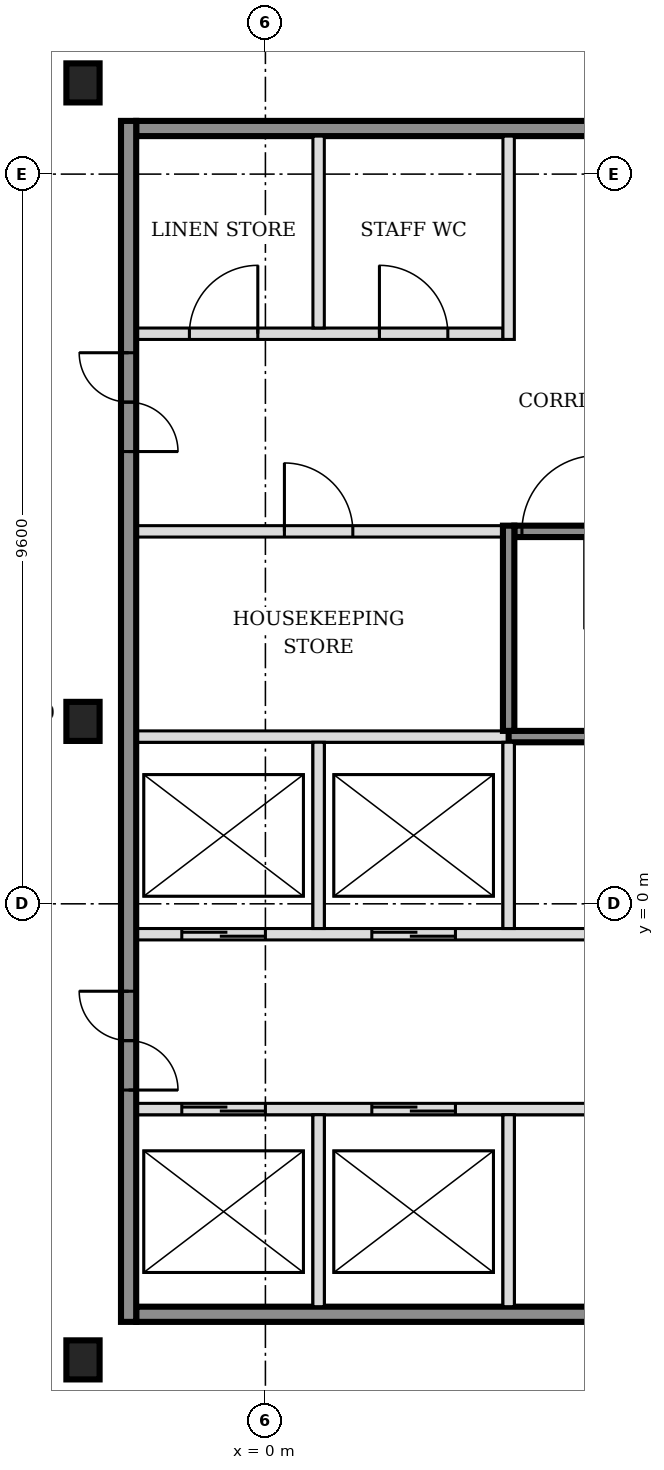
"""IFC4 building model, lengths in metres.
Left out: names, types, materials, properties, quantities, classifications, styles, units other than length and angle.
Written with IfcOpenShell. Run it as: python <this file> out.ifc"""

import sys

from ifc_helpers import new_model, si_unit, direction, frame, frame_2d, origin, origin_2d, place, context, subcontext, project, spatial, rectangle, i_section, extrude, element, fill, save


model = new_model("IFC4")
c1 = context("Model", 3, precision=1e-05, world=origin(), true_north=direction((0.0, 1.0)))
c2 = subcontext(c1, "Body", "Model", "MODEL_VIEW")
j1 = project(units=[si_unit("LENGTHUNIT", "METRE"), si_unit("PLANEANGLEUNIT", "RADIAN")], contexts=[c1])
p1 = place(None, origin())
s1 = spatial("IfcSite", under=j1, at=p1, CompositionType="ELEMENT")
p2 = place(p1, origin())
s2 = spatial("IfcBuilding", under=s1, at=p2, CompositionType="ELEMENT")
p3 = place(p2, frame((0.0, 0.0, 72.6)))
s3 = spatial("IfcBuildingStorey", under=s2, at=p3, CompositionType="ELEMENT", Elevation=72.6)
for number, where, z_axis, x_axis in (
    (1, (-2.4, -6.0, -0.15), (0.0, 0.0, 1.0), (1.0, 0.0, 0.0)),
    (2, (-2.4, 2.4, -0.15), (0.0, 0.0, 1.0), (1.0, 0.0, 0.0)),
    (3, (-2.4, 10.8, -0.15), (0.0, 0.0, 1.0), (1.0, 0.0, 0.0)),
):
    element("IfcColumn", number, at=place(p3, frame(where, z_axis=z_axis, x_axis=x_axis)), inside=s3, PredefinedType="COLUMN", context=c2, shape_type="SweptSolid", body=[
        extrude(i_section(OverallWidth=0.437, OverallDepth=0.514, WebThickness=0.061, FlangeThickness=0.097, FilletRadius=0.015, at=origin_2d()), origin(), (0.0, 0.0, 1.0), 3.6),
    ])
p4 = place(p3, frame((-1.7, -5.4, 0.0), z_axis=(0.0, 0.0, 1.0), x_axis=(1.0, 0.0, 0.0)))
e4 = element("IfcWall", 4, at=p4, inside=s3, PredefinedType="SOLIDWALL", context=c2, shape_type="SweptSolid", body=[
    extrude(rectangle(XDim=7.9, YDim=0.2, at=frame_2d((3.95, 0.0))), origin(), (0.0, 0.0, 1.0), 3.45),
])
p5 = place(p3, frame((-1.7, -2.7, 0.0), z_axis=(0.0, 0.0, 1.0), x_axis=(1.0, 0.0, 0.0)))
e5 = element("IfcWall", 5, at=p5, inside=s3, PredefinedType="SOLIDWALL", context=c2, shape_type="SweptSolid", body=[
    extrude(rectangle(XDim=7.9, YDim=0.15, at=frame_2d((3.95, 0.0))), origin(), (0.0, 0.0, 1.0), 3.45),
])
p6 = place(p5, frame((0.6, 0.0, 0.0)))
e6 = element("IfcOpeningElement", 6, at=p6, cuts=e5, PredefinedType="OPENING", context=c2, shape_type="SweptSolid", body=[
    extrude(rectangle(XDim=1.1, YDim=2.1, at=frame_2d((0.55, 1.05))), frame((0.0, 0.085, 0.0), z_axis=(0.0, -1.0, 0.0), x_axis=(1.0, 0.0, 0.0)), (0.0, 0.0, 1.0), 0.17),
])
p7 = place(p5, frame((3.1, 0.0, 0.0)))
e7 = element("IfcOpeningElement", 7, at=p7, cuts=e5, PredefinedType="OPENING", context=c2, shape_type="SweptSolid", body=[
    extrude(rectangle(XDim=1.1, YDim=2.1, at=frame_2d((0.55, 1.05))), frame((0.0, 0.085, 0.0), z_axis=(0.0, -1.0, 0.0), x_axis=(1.0, 0.0, 0.0)), (0.0, 0.0, 1.0), 0.17),
])
p8 = place(p3, frame((-1.7, -0.4, 0.0), z_axis=(0.0, 0.0, 1.0), x_axis=(1.0, 0.0, 0.0)))
e8 = element("IfcWall", 8, at=p8, inside=s3, PredefinedType="SOLIDWALL", context=c2, shape_type="SweptSolid", body=[
    extrude(rectangle(XDim=15.925, YDim=0.15, at=frame_2d((7.962, 0.0))), origin(), (0.0, 0.0, 1.0), 3.45),
])
p9 = place(p8, frame((0.6, 0.0, 0.0)))
e9 = element("IfcOpeningElement", 9, at=p9, cuts=e8, PredefinedType="OPENING", context=c2, shape_type="SweptSolid", body=[
    extrude(rectangle(XDim=1.1, YDim=2.1, at=frame_2d((0.55, 1.05))), frame((0.0, 0.085, 0.0), z_axis=(0.0, -1.0, 0.0), x_axis=(1.0, 0.0, 0.0)), (0.0, 0.0, 1.0), 0.17),
])
p10 = place(p8, frame((3.1, 0.0, 0.0)))
e10 = element("IfcOpeningElement", 10, at=p10, cuts=e8, PredefinedType="OPENING", context=c2, shape_type="SweptSolid", body=[
    extrude(rectangle(XDim=1.1, YDim=2.1, at=frame_2d((0.55, 1.05))), frame((0.0, 0.085, 0.0), z_axis=(0.0, -1.0, 0.0), x_axis=(1.0, 0.0, 0.0)), (0.0, 0.0, 1.0), 0.17),
])
p11 = place(p8, frame((11.575, 0.0, 0.0)))
e11 = element("IfcOpeningElement", 11, at=p11, cuts=e8, PredefinedType="OPENING", context=c2, shape_type="SweptSolid", body=[
    extrude(rectangle(XDim=1.2, YDim=2.1, at=frame_2d((0.6, 1.05))), frame((0.0, 0.085, 0.0), z_axis=(0.0, -1.0, 0.0), x_axis=(1.0, 0.0, 0.0)), (0.0, 0.0, 1.0), 0.17),
])
p12 = place(p8, frame((14.125, 0.0, 0.0)))
e12 = element("IfcOpeningElement", 12, at=p12, cuts=e8, PredefinedType="OPENING", context=c2, shape_type="SweptSolid", body=[
    extrude(rectangle(XDim=1.2, YDim=2.1, at=frame_2d((0.6, 1.05))), frame((0.0, 0.085, 0.0), z_axis=(0.0, -1.0, 0.0), x_axis=(1.0, 0.0, 0.0)), (0.0, 0.0, 1.0), 0.17),
])
p13 = place(p3, frame((-1.7, 2.2, 0.0), z_axis=(0.0, 0.0, 1.0), x_axis=(1.0, 0.0, 0.0)))
e13 = element("IfcWall", 13, at=p13, inside=s3, PredefinedType="SOLIDWALL", context=c2, shape_type="SweptSolid", body=[
    extrude(rectangle(XDim=4.9, YDim=0.15, at=frame_2d((2.45, 0.0))), origin(), (0.0, 0.0, 1.0), 3.45),
])
p14 = place(p3, frame((3.2, 2.2, 0.0), z_axis=(0.0, 0.0, 1.0), x_axis=(1.0, 0.0, 0.0)))
e14 = element("IfcWall", 14, at=p14, inside=s3, PredefinedType="SOLIDWALL", context=c2, shape_type="SweptSolid", body=[
    extrude(rectangle(XDim=6.5, YDim=0.15, at=frame_2d((3.25, 0.0))), origin(), (0.0, 0.0, 1.0), 3.45),
])
p15 = place(p3, frame((-1.7, 4.9, 0.0), z_axis=(0.0, 0.0, 1.0), x_axis=(1.0, 0.0, 0.0)))
e15 = element("IfcWall", 15, at=p15, inside=s3, PredefinedType="PARTITIONING", context=c2, shape_type="SweptSolid", body=[
    extrude(rectangle(XDim=4.825, YDim=0.15, at=frame_2d((2.413, 0.0))), origin(), (0.0, 0.0, 1.0), 3.45),
])
p16 = place(p15, frame((1.95, 0.0, 0.0)))
e16 = element("IfcOpeningElement", 16, at=p16, cuts=e15, PredefinedType="OPENING", context=c2, shape_type="SweptSolid", body=[
    extrude(rectangle(XDim=0.9, YDim=2.1, at=frame_2d((0.45, 1.05))), frame((0.0, 0.085, 0.0), z_axis=(0.0, -1.0, 0.0), x_axis=(1.0, 0.0, 0.0)), (0.0, 0.0, 1.0), 0.17),
])
p17 = place(p3, frame((3.275, 4.9, 0.0), z_axis=(0.0, 0.0, 1.0), x_axis=(1.0, 0.0, 0.0)))
e17 = element("IfcWall", 17, at=p17, inside=s3, PredefinedType="SOLIDWALL", context=c2, shape_type="SweptSolid", body=[
    extrude(rectangle(XDim=6.425, YDim=0.15, at=frame_2d((3.212, 0.0))), origin(), (0.0, 0.0, 1.0), 3.45),
])
p18 = place(p17, frame((0.1, 0.0, 0.0)))
e18 = element("IfcOpeningElement", 18, at=p18, cuts=e17, PredefinedType="OPENING", context=c2, shape_type="SweptSolid", body=[
    extrude(rectangle(XDim=1.0, YDim=2.1, at=frame_2d((0.5, 1.05))), frame((0.0, 0.085, 0.0), z_axis=(0.0, -1.0, 0.0), x_axis=(1.0, 0.0, 0.0)), (0.0, 0.0, 1.0), 0.17),
])
p19 = place(p3, frame((-1.7, 7.5, 0.0), z_axis=(0.0, 0.0, 1.0), x_axis=(1.0, 0.0, 0.0)))
e19 = element("IfcWall", 19, at=p19, inside=s3, PredefinedType="PARTITIONING", context=c2, shape_type="SweptSolid", body=[
    extrude(rectangle(XDim=4.825, YDim=0.15, at=frame_2d((2.413, 0.0))), origin(), (0.0, 0.0, 1.0), 3.45),
])
p20 = place(p19, frame((0.7, 0.0, 0.0)))
e20 = element("IfcOpeningElement", 20, at=p20, cuts=e19, PredefinedType="OPENING", context=c2, shape_type="SweptSolid", body=[
    extrude(rectangle(XDim=0.9, YDim=2.1, at=frame_2d((0.45, 1.05))), frame((0.0, 0.085, 0.0), z_axis=(0.0, -1.0, 0.0), x_axis=(1.0, 0.0, 0.0)), (0.0, 0.0, 1.0), 0.17),
])
p21 = place(p19, frame((3.2, 0.0, 0.0)))
e21 = element("IfcOpeningElement", 21, at=p21, cuts=e19, PredefinedType="OPENING", context=c2, shape_type="SweptSolid", body=[
    extrude(rectangle(XDim=0.9, YDim=2.1, at=frame_2d((0.45, 1.05))), frame((0.0, 0.085, 0.0), z_axis=(0.0, -1.0, 0.0), x_axis=(1.0, 0.0, 0.0)), (0.0, 0.0, 1.0), 0.17),
])
p22 = place(p3, frame((-1.7, 10.2, 0.0), z_axis=(0.0, 0.0, 1.0), x_axis=(1.0, 0.0, 0.0)))
e22 = element("IfcWall", 22, at=p22, inside=s3, PredefinedType="SOLIDWALL", context=c2, shape_type="SweptSolid", body=[
    extrude(rectangle(XDim=7.9, YDim=0.2, at=frame_2d((3.95, 0.0))), origin(), (0.0, 0.0, 1.0), 3.45),
])
p23 = place(p3, frame((-1.8, -5.5, 0.0), z_axis=(0.0, 0.0, 1.0), x_axis=(0.0, 1.0, 0.0)))
e23 = element("IfcWall", 23, at=p23, inside=s3, PredefinedType="SOLIDWALL", context=c2, shape_type="SweptSolid", body=[
    extrude(rectangle(XDim=15.8, YDim=0.2, at=frame_2d((7.9, 0.0))), origin(), (0.0, 0.0, 1.0), 3.45),
])
p24 = place(p23, frame((3.05, 0.0, 0.0)))
e24 = element("IfcOpeningElement", 24, at=p24, cuts=e23, PredefinedType="OPENING", context=c2, shape_type="SweptSolid", body=[
    extrude(rectangle(XDim=1.3, YDim=2.1, at=frame_2d((0.65, 1.05))), frame((0.0, 0.11, 0.0), z_axis=(0.0, -1.0, 0.0), x_axis=(1.0, 0.0, 0.0)), (0.0, 0.0, 1.0), 0.22),
])
p25 = place(p23, frame((11.45, 0.0, 0.0)))
e25 = element("IfcOpeningElement", 25, at=p25, cuts=e23, PredefinedType="OPENING", context=c2, shape_type="SweptSolid", body=[
    extrude(rectangle(XDim=1.3, YDim=2.1, at=frame_2d((0.65, 1.05))), frame((0.0, 0.11, 0.0), z_axis=(0.0, -1.0, 0.0), x_axis=(1.0, 0.0, 0.0)), (0.0, 0.0, 1.0), 0.22),
])
p26 = place(p3, frame((0.7, -5.3, 0.0), z_axis=(0.0, 0.0, 1.0), x_axis=(0.0, 1.0, 0.0)))
e26 = element("IfcWall", 26, at=p26, inside=s3, PredefinedType="SOLIDWALL", context=c2, shape_type="SweptSolid", body=[
    extrude(rectangle(XDim=2.525, YDim=0.15, at=frame_2d((1.263, 0.0))), origin(), (0.0, 0.0, 1.0), 3.45),
])
p27 = place(p3, frame((0.7, -0.325, 0.0), z_axis=(0.0, 0.0, 1.0), x_axis=(0.0, 1.0, 0.0)))
e27 = element("IfcWall", 27, at=p27, inside=s3, PredefinedType="SOLIDWALL", context=c2, shape_type="SweptSolid", body=[
    extrude(rectangle(XDim=2.45, YDim=0.15, at=frame_2d((1.225, 0.0))), origin(), (0.0, 0.0, 1.0), 3.45),
])
p28 = place(p3, frame((0.7, 7.575, 0.0), z_axis=(0.0, 0.0, 1.0), x_axis=(0.0, 1.0, 0.0)))
e28 = element("IfcWall", 28, at=p28, inside=s3, PredefinedType="PARTITIONING", context=c2, shape_type="SweptSolid", body=[
    extrude(rectangle(XDim=2.525, YDim=0.15, at=frame_2d((1.263, 0.0))), origin(), (0.0, 0.0, 1.0), 3.45),
])
p29 = place(p3, frame((3.2, -5.3, 0.0), z_axis=(0.0, 0.0, 1.0), x_axis=(0.0, 1.0, 0.0)))
e29 = element("IfcWall", 29, at=p29, inside=s3, PredefinedType="SOLIDWALL", context=c2, shape_type="SweptSolid", body=[
    extrude(rectangle(XDim=2.525, YDim=0.15, at=frame_2d((1.263, 0.0))), origin(), (0.0, 0.0, 1.0), 3.45),
])
p30 = place(p3, frame((3.2, -0.325, 0.0), z_axis=(0.0, 0.0, 1.0), x_axis=(0.0, 1.0, 0.0)))
e30 = element("IfcWall", 30, at=p30, inside=s3, PredefinedType="SOLIDWALL", context=c2, shape_type="SweptSolid", body=[
    extrude(rectangle(XDim=2.45, YDim=0.15, at=frame_2d((1.225, 0.0))), origin(), (0.0, 0.0, 1.0), 3.45),
])
p31 = place(p3, frame((3.2, 2.275, 0.0), z_axis=(0.0, 0.0, 1.0), x_axis=(0.0, 1.0, 0.0)))
e31 = element("IfcWall", 31, at=p31, inside=s3, PredefinedType="SOLIDWALL", context=c2, shape_type="SweptSolid", body=[
    extrude(rectangle(XDim=2.7, YDim=0.15, at=frame_2d((1.35, 0.0))), origin(), (0.0, 0.0, 1.0), 3.45),
])
p32 = place(p3, frame((3.2, 7.425, 0.0), z_axis=(0.0, 0.0, 1.0), x_axis=(0.0, 1.0, 0.0)))
e32 = element("IfcWall", 32, at=p32, inside=s3, PredefinedType="PARTITIONING", context=c2, shape_type="SweptSolid", body=[
    extrude(rectangle(XDim=2.675, YDim=0.15, at=frame_2d((1.337, 0.0))), origin(), (0.0, 0.0, 1.0), 3.45),
])
p33 = place(p6, origin())
e33 = element("IfcDoor", 33, at=p33, inside=s3, OperationType="DOUBLE_DOOR_SLIDING", PredefinedType="DOOR", context=c2, shape_type="SweptSolid", body=[
    extrude(rectangle(XDim=1.1, YDim=2.1, at=frame_2d((0.55, 1.05))), frame((0.0, 0.025, 0.0), z_axis=(0.0, -1.0, 0.0), x_axis=(1.0, 0.0, 0.0)), (0.0, 0.0, 1.0), 0.05),
])
fill(e6, e33)
p34 = place(p7, origin())
e34 = element("IfcDoor", 34, at=p34, inside=s3, OperationType="DOUBLE_DOOR_SLIDING", PredefinedType="DOOR", context=c2, shape_type="SweptSolid", body=[
    extrude(rectangle(XDim=1.1, YDim=2.1, at=frame_2d((0.55, 1.05))), frame((0.0, 0.025, 0.0), z_axis=(0.0, -1.0, 0.0), x_axis=(1.0, 0.0, 0.0)), (0.0, 0.0, 1.0), 0.05),
])
fill(e7, e34)
p35 = place(p9, origin())
e35 = element("IfcDoor", 35, at=p35, inside=s3, OperationType="DOUBLE_DOOR_SLIDING", PredefinedType="DOOR", context=c2, shape_type="SweptSolid", body=[
    extrude(rectangle(XDim=1.1, YDim=2.1, at=frame_2d((0.55, 1.05))), frame((0.0, 0.025, 0.0), z_axis=(0.0, -1.0, 0.0), x_axis=(1.0, 0.0, 0.0)), (0.0, 0.0, 1.0), 0.05),
])
fill(e9, e35)
p36 = place(p10, origin())
e36 = element("IfcDoor", 36, at=p36, inside=s3, OperationType="DOUBLE_DOOR_SLIDING", PredefinedType="DOOR", context=c2, shape_type="SweptSolid", body=[
    extrude(rectangle(XDim=1.1, YDim=2.1, at=frame_2d((0.55, 1.05))), frame((0.0, 0.025, 0.0), z_axis=(0.0, -1.0, 0.0), x_axis=(1.0, 0.0, 0.0)), (0.0, 0.0, 1.0), 0.05),
])
fill(e10, e36)
p37 = place(p18, origin())
e37 = element("IfcDoor", 37, at=p37, inside=s3, OperationType="SINGLE_SWING_RIGHT", PredefinedType="DOOR", context=c2, shape_type="SweptSolid", body=[
    extrude(rectangle(XDim=1.0, YDim=2.1, at=frame_2d((0.5, 1.05))), frame((0.0, 0.025, 0.0), z_axis=(0.0, -1.0, 0.0), x_axis=(1.0, 0.0, 0.0)), (0.0, 0.0, 1.0), 0.05),
])
fill(e18, e37)
p38 = place(p24, origin())
e38 = element("IfcDoor", 38, at=p38, inside=s3, OperationType="DOUBLE_DOOR_SINGLE_SWING", PredefinedType="DOOR", context=c2, shape_type="SweptSolid", body=[
    extrude(rectangle(XDim=1.3, YDim=2.1, at=frame_2d((0.65, 1.05))), frame((0.0, 0.025, 0.0), z_axis=(0.0, -1.0, 0.0), x_axis=(1.0, 0.0, 0.0)), (0.0, 0.0, 1.0), 0.05),
])
fill(e24, e38)
p39 = place(p25, origin())
e39 = element("IfcDoor", 39, at=p39, inside=s3, OperationType="DOUBLE_DOOR_SINGLE_SWING", PredefinedType="DOOR", context=c2, shape_type="SweptSolid", body=[
    extrude(rectangle(XDim=1.3, YDim=2.1, at=frame_2d((0.65, 1.05))), frame((0.0, 0.025, 0.0), z_axis=(0.0, -1.0, 0.0), x_axis=(1.0, 0.0, 0.0)), (0.0, 0.0, 1.0), 0.05),
])
fill(e25, e39)
p40 = place(p16, origin())
e40 = element("IfcDoor", 40, at=p40, inside=s3, OperationType="SINGLE_SWING_LEFT", PredefinedType="DOOR", context=c2, shape_type="SweptSolid", body=[
    extrude(rectangle(XDim=0.9, YDim=2.1, at=frame_2d((0.45, 1.05))), frame((0.0, 0.025, 0.0), z_axis=(0.0, -1.0, 0.0), x_axis=(1.0, 0.0, 0.0)), (0.0, 0.0, 1.0), 0.05),
])
fill(e16, e40)
p41 = place(p20, origin())
e41 = element("IfcDoor", 41, at=p41, inside=s3, OperationType="SINGLE_SWING_RIGHT", PredefinedType="DOOR", context=c2, shape_type="SweptSolid", body=[
    extrude(rectangle(XDim=0.9, YDim=2.1, at=frame_2d((0.45, 1.05))), frame((0.0, 0.025, 0.0), z_axis=(0.0, -1.0, 0.0), x_axis=(1.0, 0.0, 0.0)), (0.0, 0.0, 1.0), 0.05),
])
fill(e20, e41)
p42 = place(p21, origin())
e42 = element("IfcDoor", 42, at=p42, inside=s3, OperationType="SINGLE_SWING_LEFT", PredefinedType="DOOR", context=c2, shape_type="SweptSolid", body=[
    extrude(rectangle(XDim=0.9, YDim=2.1, at=frame_2d((0.45, 1.05))), frame((0.0, 0.025, 0.0), z_axis=(0.0, -1.0, 0.0), x_axis=(1.0, 0.0, 0.0)), (0.0, 0.0, 1.0), 0.05),
])
fill(e21, e42)
save(model, sys.argv[1])
